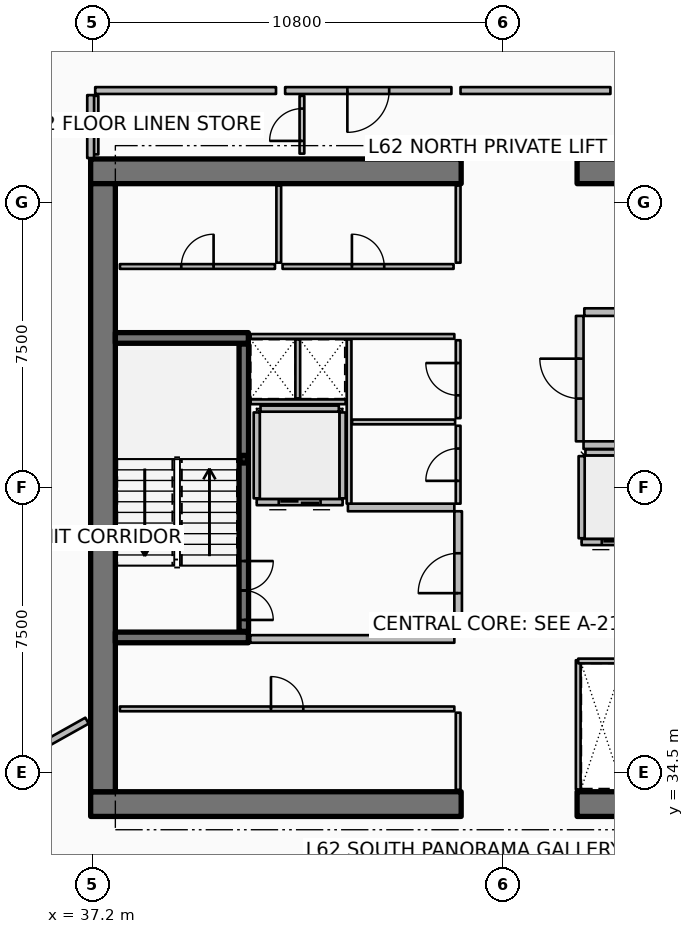
"""IFC4 building model, lengths in metres.
Left out: names, types, materials, properties, quantities, classifications, styles, units other than length and angle.
Written with IfcOpenShell. Run it as: python <this file> out.ifc"""

import sys

from ifc_helpers import new_model, si_unit, direction, frame, frame_2d, origin, origin_2d, place, context, subcontext, project, spatial, rectangle, hollow_rectangle, extrude, element, fill, save


model = new_model("IFC4")
c1 = context("Model", 3, precision=1e-05, world=origin(), true_north=direction((0.0, 1.0)))
c2 = subcontext(c1, "Body", "Model", "MODEL_VIEW")
j1 = project(units=[si_unit("LENGTHUNIT", "METRE"), si_unit("PLANEANGLEUNIT", "RADIAN")], contexts=[c1])
p1 = place(None, origin())
s1 = spatial("IfcSite", under=j1, at=p1, CompositionType="ELEMENT")
p2 = place(p1, origin())
s2 = spatial("IfcBuilding", under=s1, at=p2, CompositionType="ELEMENT")
p3 = place(p2, frame((0.0, 0.0, 248.25)))
s3 = spatial("IfcBuildingStorey", under=s2, at=p3, CompositionType="ELEMENT", Elevation=248.25)
for number, where, z_axis, x_axis in (
    (1, (37.15, 33.675, 0.0), (0.0, 0.0, 1.0), (1.0, 0.0, 0.0)),
    (2, (49.95, 33.675, 0.0), (0.0, 0.0, 1.0), (1.0, 0.0, 0.0)),
    (3, (37.15, 50.325, 0.0), (0.0, 0.0, 1.0), (1.0, 0.0, 0.0)),
    (4, (49.95, 50.325, 0.0), (0.0, 0.0, 1.0), (1.0, 0.0, 0.0)),
):
    element("IfcWall", number, at=place(p3, frame(where, z_axis=z_axis, x_axis=x_axis)), inside=s3, PredefinedType="SHEAR", context=c2, shape_type="SweptSolid", body=[
        extrude(rectangle(XDim=9.75, YDim=0.65, at=frame_2d((4.875, 0.0))), origin(), (0.0, 0.0, 1.0), 3.85),
    ])
p4 = place(p3, frame((37.475, 34.0, 0.0), z_axis=(0.0, 0.0, 1.0), x_axis=(0.0, 1.0, 0.0)))
e5 = element("IfcWall", 5, at=p4, inside=s3, PredefinedType="SHEAR", context=c2, shape_type="SweptSolid", body=[
    extrude(rectangle(XDim=16.0, YDim=0.65, at=frame_2d((8.0, 0.0))), origin(), (0.0, 0.0, 1.0), 3.85),
])
for number, where, z_axis, x_axis in (
    (6, (37.8, 38.06, 0.0), (0.0, 0.0, 1.0), (1.0, 0.0, 0.0)),
    (7, (37.8, 45.94, 0.0), (0.0, 0.0, 1.0), (1.0, 0.0, 0.0)),
):
    element("IfcWall", number, at=place(p3, frame(where, z_axis=z_axis, x_axis=x_axis)), inside=s3, PredefinedType="SHEAR", context=c2, shape_type="SweptSolid", body=[
        extrude(rectangle(XDim=3.5, YDim=0.28, at=frame_2d((1.75, 0.0))), origin(), (0.0, 0.0, 1.0), 3.85),
    ])
p5 = place(p3, frame((41.18, 42.75, 0.0), z_axis=(0.0, 0.0, 1.0), x_axis=(1.0, 0.0, 0.0)))
e8 = element("IfcColumn", 8, at=p5, inside=s3, PredefinedType="COLUMN", context=c2, shape_type="SweptSolid", body=[
    extrude(hollow_rectangle(XDim=0.2, YDim=0.2, WallThickness=0.01, InnerFilletRadius=0.01, OuterFilletRadius=0.02, at=origin_2d()), origin(), (0.0, 0.0, 1.0), 1.72),
])
p6 = place(p3, frame((41.18, 38.22, 0.0), z_axis=(0.0, 0.0, 1.0), x_axis=(0.0, 1.0, 0.0)))
e9 = element("IfcWall", 9, at=p6, inside=s3, PredefinedType="SOLIDWALL", context=c2, shape_type="SweptSolid", body=[
    extrude(rectangle(XDim=7.56, YDim=0.25, at=frame_2d((3.78, 0.0))), origin(), (0.0, 0.0, 1.0), 3.59),
])
p7 = place(p6, frame((0.3, 0.0, 0.0)))
e10 = element("IfcOpeningElement", 10, at=p7, cuts=e9, PredefinedType="OPENING", context=c2, shape_type="SweptSolid", body=[
    extrude(rectangle(XDim=1.55, YDim=2.15, at=frame_2d((0.775, 1.075))), frame((0.0, 0.135, 0.0), z_axis=(0.0, -1.0, 0.0), x_axis=(1.0, 0.0, 0.0)), (0.0, 0.0, 1.0), 0.27),
])
p8 = place(p3, frame((43.78, 41.62, 0.0), z_axis=(0.0, 0.0, 1.0), x_axis=(-1.0, 0.0, 0.0)))
e11 = element("IfcWall", 11, at=p8, inside=s3, PredefinedType="PARTITIONING", context=c2, shape_type="SweptSolid", body=[
    extrude(rectangle(XDim=2.26, YDim=0.16, at=frame_2d((1.13, 0.0))), origin(), (0.0, 0.0, 1.0), 3.59),
])
p9 = place(p8, frame((0.58, 0.0, 0.0)))
e12 = element("IfcOpeningElement", 12, at=p9, cuts=e11, PredefinedType="OPENING", context=c2, shape_type="SweptSolid", body=[
    extrude(rectangle(XDim=1.1, YDim=2.1, at=frame_2d((0.55, 1.05))), frame((0.0, 0.09, 0.0), z_axis=(0.0, -1.0, 0.0), x_axis=(1.0, 0.0, 0.0)), (0.0, 0.0, 1.0), 0.18),
])
for number, where, z_axis, x_axis in (
    (13, (43.78, 41.72, 0.0), (0.0, 0.0, 1.0), (0.0, 1.0, 0.0)),
    (14, (41.52, 41.72, 0.0), (0.0, 0.0, 1.0), (0.0, 1.0, 0.0)),
):
    element("IfcWall", number, at=place(p3, frame(where, z_axis=z_axis, x_axis=x_axis)), inside=s3, PredefinedType="PARTITIONING", context=c2, shape_type="SweptSolid", body=[
        extrude(rectangle(XDim=2.26, YDim=0.16, at=frame_2d((1.13, 0.0))), origin(), (0.0, 0.0, 1.0), 3.59),
    ])
p10 = place(p3, frame((41.62, 44.08, 0.0), z_axis=(0.0, 0.0, 1.0), x_axis=(1.0, 0.0, 0.0)))
e15 = element("IfcWall", 15, at=p10, inside=s3, PredefinedType="PARTITIONING", context=c2, shape_type="SweptSolid", body=[
    extrude(rectangle(XDim=2.06, YDim=0.16, at=frame_2d((1.03, 0.0))), origin(), (0.0, 0.0, 1.0), 3.59),
])
p11 = place(p3, frame((52.23, 40.57, 0.0), z_axis=(0.0, 0.0, 1.0), x_axis=(-1.0, 0.0, 0.0)))
e16 = element("IfcWall", 16, at=p11, inside=s3, PredefinedType="PARTITIONING", context=c2, shape_type="SweptSolid", body=[
    extrude(rectangle(XDim=2.16, YDim=0.16, at=frame_2d((1.08, 0.0))), origin(), (0.0, 0.0, 1.0), 3.59),
])
p12 = place(p11, frame((0.53, 0.0, 0.0)))
e17 = element("IfcOpeningElement", 17, at=p12, cuts=e16, PredefinedType="OPENING", context=c2, shape_type="SweptSolid", body=[
    extrude(rectangle(XDim=1.1, YDim=2.1, at=frame_2d((0.55, 1.05))), frame((0.0, 0.09, 0.0), z_axis=(0.0, -1.0, 0.0), x_axis=(1.0, 0.0, 0.0)), (0.0, 0.0, 1.0), 0.18),
])
p13 = place(p3, frame((50.07, 40.67, 0.0), z_axis=(0.0, 0.0, 1.0), x_axis=(0.0, 1.0, 0.0)))
e18 = element("IfcWall", 18, at=p13, inside=s3, PredefinedType="PARTITIONING", context=c2, shape_type="SweptSolid", body=[
    extrude(rectangle(XDim=2.16, YDim=0.16, at=frame_2d((1.08, 0.0))), origin(), (0.0, 0.0, 1.0), 3.59),
])
p14 = place(p3, frame((50.17, 42.93, 0.0), z_axis=(0.0, 0.0, 1.0), x_axis=(1.0, 0.0, 0.0)))
e19 = element("IfcWall", 19, at=p14, inside=s3, PredefinedType="PARTITIONING", context=c2, shape_type="SweptSolid", body=[
    extrude(rectangle(XDim=1.96, YDim=0.16, at=frame_2d((0.98, 0.0))), origin(), (0.0, 0.0, 1.0), 3.59),
])
p15 = place(p3, frame((46.82, 34.05, 0.0), z_axis=(0.0, 0.0, 1.0), x_axis=(0.0, 1.0, 0.0)))
e20 = element("IfcWall", 20, at=p15, inside=s3, PredefinedType="PARTITIONING", context=c2, shape_type="SweptSolid", body=[
    extrude(rectangle(XDim=2.03, YDim=0.125, at=frame_2d((1.015, 0.0))), origin(), (0.0, 0.0, 1.0), 3.03),
])
p16 = place(p3, frame((37.92, 36.18, 0.0), z_axis=(0.0, 0.0, 1.0), x_axis=(1.0, 0.0, 0.0)))
e21 = element("IfcWall", 21, at=p16, inside=s3, PredefinedType="PARTITIONING", context=c2, shape_type="SweptSolid", body=[
    extrude(rectangle(XDim=8.8, YDim=0.125, at=frame_2d((4.4, 0.0))), origin(), (0.0, 0.0, 1.0), 3.03),
])
p17 = place(p16, frame((3.975, 0.0, 0.0)))
e22 = element("IfcOpeningElement", 22, at=p17, cuts=e21, PredefinedType="OPENING", context=c2, shape_type="SweptSolid", body=[
    extrude(rectangle(XDim=0.85, YDim=2.06, at=frame_2d((0.425, 1.03))), frame((0.0, 0.073, 0.0), z_axis=(0.0, -1.0, 0.0), x_axis=(1.0, 0.0, 0.0)), (0.0, 0.0, 1.0), 0.145),
])
for number, where, z_axis, x_axis in (
    (23, (46.82, 47.92, 0.0), (0.0, 0.0, 1.0), (0.0, 1.0, 0.0)),
    (24, (42.1, 47.92, 0.0), (0.0, 0.0, 1.0), (0.0, 1.0, 0.0)),
):
    element("IfcWall", number, at=place(p3, frame(where, z_axis=z_axis, x_axis=x_axis)), inside=s3, PredefinedType="PARTITIONING", context=c2, shape_type="SweptSolid", body=[
        extrude(rectangle(XDim=2.03, YDim=0.125, at=frame_2d((1.015, 0.0))), origin(), (0.0, 0.0, 1.0), 3.03),
    ])
p18 = place(p3, frame((37.92, 47.82, 0.0), z_axis=(0.0, 0.0, 1.0), x_axis=(1.0, 0.0, 0.0)))
e25 = element("IfcWall", 25, at=p18, inside=s3, PredefinedType="PARTITIONING", context=c2, shape_type="SweptSolid", body=[
    extrude(rectangle(XDim=4.08, YDim=0.125, at=frame_2d((2.04, 0.0))), origin(), (0.0, 0.0, 1.0), 3.03),
])
p19 = place(p18, frame((1.615, 0.0, 0.0)))
e26 = element("IfcOpeningElement", 26, at=p19, cuts=e25, PredefinedType="OPENING", context=c2, shape_type="SweptSolid", body=[
    extrude(rectangle(XDim=0.85, YDim=2.06, at=frame_2d((0.425, 1.03))), frame((0.0, 0.073, 0.0), z_axis=(0.0, -1.0, 0.0), x_axis=(1.0, 0.0, 0.0)), (0.0, 0.0, 1.0), 0.145),
])
p20 = place(p3, frame((42.2, 47.82, 0.0), z_axis=(0.0, 0.0, 1.0), x_axis=(1.0, 0.0, 0.0)))
e27 = element("IfcWall", 27, at=p20, inside=s3, PredefinedType="PARTITIONING", context=c2, shape_type="SweptSolid", body=[
    extrude(rectangle(XDim=4.5, YDim=0.125, at=frame_2d((2.25, 0.0))), origin(), (0.0, 0.0, 1.0), 3.03),
])
p21 = place(p20, frame((1.825, 0.0, 0.0)))
e28 = element("IfcOpeningElement", 28, at=p21, cuts=e27, PredefinedType="OPENING", context=c2, shape_type="SweptSolid", body=[
    extrude(rectangle(XDim=0.85, YDim=2.06, at=frame_2d((0.425, 1.03))), frame((0.0, 0.073, 0.0), z_axis=(0.0, -1.0, 0.0), x_axis=(1.0, 0.0, 0.0)), (0.0, 0.0, 1.0), 0.145),
])
p22 = place(p3, frame((41.35, 38.02, 0.0), z_axis=(0.0, 0.0, 1.0), x_axis=(1.0, 0.0, 0.0)))
e29 = element("IfcWall", 29, at=p22, inside=s3, PredefinedType="PARTITIONING", context=c2, shape_type="SweptSolid", body=[
    extrude(rectangle(XDim=5.37, YDim=0.2, at=frame_2d((2.685, 0.0))), origin(), (0.0, 0.0, 1.0), 3.59),
])
p23 = place(p3, frame((43.92, 41.48, 0.0), z_axis=(0.0, 0.0, 1.0), x_axis=(1.0, 0.0, 0.0)))
e30 = element("IfcWall", 30, at=p23, inside=s3, PredefinedType="PARTITIONING", context=c2, shape_type="SweptSolid", body=[
    extrude(rectangle(XDim=2.8, YDim=0.2, at=frame_2d((1.4, 0.0))), origin(), (0.0, 0.0, 1.0), 3.59),
])
p24 = place(p3, frame((46.82, 38.12, 0.0), z_axis=(0.0, 0.0, 1.0), x_axis=(0.0, 1.0, 0.0)))
e31 = element("IfcWall", 31, at=p24, inside=s3, PredefinedType="PARTITIONING", context=c2, shape_type="SweptSolid", body=[
    extrude(rectangle(XDim=3.26, YDim=0.2, at=frame_2d((1.63, 0.0))), origin(), (0.0, 0.0, 1.0), 3.59),
])
p25 = place(p24, frame((1.105, 0.0, 0.0)))
e32 = element("IfcOpeningElement", 32, at=p25, cuts=e31, PredefinedType="OPENING", context=c2, shape_type="SweptSolid", body=[
    extrude(rectangle(XDim=1.05, YDim=2.1, at=frame_2d((0.525, 1.05))), frame((0.0, 0.11, 0.0), z_axis=(0.0, -1.0, 0.0), x_axis=(1.0, 0.0, 0.0)), (0.0, 0.0, 1.0), 0.22),
])
p26 = place(p3, frame((50.12, 43.12, 0.0), z_axis=(0.0, 0.0, 1.0), x_axis=(1.0, 0.0, 0.0)))
e33 = element("IfcWall", 33, at=p26, inside=s3, PredefinedType="PARTITIONING", context=c2, shape_type="SweptSolid", body=[
    extrude(rectangle(XDim=8.88, YDim=0.2, at=frame_2d((4.44, 0.0))), origin(), (0.0, 0.0, 1.0), 3.59),
])
p27 = place(p3, frame((50.14, 46.62, 0.0), z_axis=(0.0, 0.0, 1.0), x_axis=(1.0, 0.0, 0.0)))
e34 = element("IfcWall", 34, at=p27, inside=s3, PredefinedType="PARTITIONING", context=c2, shape_type="SweptSolid", body=[
    extrude(rectangle(XDim=1.02, YDim=0.2, at=frame_2d((0.51, 0.0))), origin(), (0.0, 0.0, 1.0), 3.59),
])
p28 = place(p3, frame((50.02, 43.22, 0.0), z_axis=(0.0, 0.0, 1.0), x_axis=(0.0, 1.0, 0.0)))
e35 = element("IfcWall", 35, at=p28, inside=s3, PredefinedType="PARTITIONING", context=c2, shape_type="SweptSolid", body=[
    extrude(rectangle(XDim=3.3, YDim=0.2, at=frame_2d((1.65, 0.0))), origin(), (0.0, 0.0, 1.0), 3.59),
])
p29 = place(p28, frame((1.125, 0.0, 0.0)))
e36 = element("IfcOpeningElement", 36, at=p29, cuts=e35, PredefinedType="OPENING", context=c2, shape_type="SweptSolid", body=[
    extrude(rectangle(XDim=1.05, YDim=2.1, at=frame_2d((0.525, 1.05))), frame((0.0, 0.11, 0.0), z_axis=(0.0, -1.0, 0.0), x_axis=(1.0, 0.0, 0.0)), (0.0, 0.0, 1.0), 0.22),
])
p30 = place(p3, frame((41.36, 45.98, 0.0), z_axis=(0.0, 0.0, 1.0), x_axis=(1.0, 0.0, 0.0)))
e37 = element("IfcWall", 37, at=p30, inside=s3, PredefinedType="PARTITIONING", context=c2, shape_type="SweptSolid", body=[
    extrude(rectangle(XDim=5.36, YDim=0.125, at=frame_2d((2.68, 0.0))), origin(), (0.0, 0.0, 1.0), 3.03),
])
p31 = place(p3, frame((41.36, 44.26, 0.0), z_axis=(0.0, 0.0, 1.0), x_axis=(1.0, 0.0, 0.0)))
e38 = element("IfcWall", 38, at=p31, inside=s3, PredefinedType="PARTITIONING", context=c2, shape_type="SweptSolid", body=[
    extrude(rectangle(XDim=2.5, YDim=0.125, at=frame_2d((1.25, 0.0))), origin(), (0.0, 0.0, 1.0), 3.03),
])
p32 = place(p3, frame((42.6, 44.35, 0.0), z_axis=(0.0, 0.0, 1.0), x_axis=(0.0, 1.0, 0.0)))
e39 = element("IfcWall", 39, at=p32, inside=s3, PredefinedType="PARTITIONING", context=c2, shape_type="SweptSolid", body=[
    extrude(rectangle(XDim=1.55, YDim=0.125, at=frame_2d((0.775, 0.0))), origin(), (0.0, 0.0, 1.0), 3.03),
])
p33 = place(p3, frame((49.98, 34.06, 0.0), z_axis=(0.0, 0.0, 1.0), x_axis=(0.0, 1.0, 0.0)))
e40 = element("IfcWall", 40, at=p33, inside=s3, PredefinedType="PARTITIONING", context=c2, shape_type="SweptSolid", body=[
    extrude(rectangle(XDim=3.4, YDim=0.125, at=frame_2d((1.7, 0.0))), origin(), (0.0, 0.0, 1.0), 3.03),
])
p34 = place(p3, frame((49.98, 37.44, 0.0), z_axis=(0.0, 0.0, 1.0), x_axis=(1.0, 0.0, 0.0)))
e41 = element("IfcWall", 41, at=p34, inside=s3, PredefinedType="PARTITIONING", context=c2, shape_type="SweptSolid", body=[
    extrude(rectangle(XDim=1.26, YDim=0.125, at=frame_2d((0.63, 0.0))), origin(), (0.0, 0.0, 1.0), 3.03),
])
p35 = place(p3, frame((43.95, 41.58, 0.0), z_axis=(0.0, 0.0, 1.0), x_axis=(0.0, 1.0, 0.0)))
e42 = element("IfcWall", 42, at=p35, inside=s3, PredefinedType="PARTITIONING", context=c2, shape_type="SweptSolid", body=[
    extrude(rectangle(XDim=4.32, YDim=0.125, at=frame_2d((2.16, 0.0))), origin(), (0.0, 0.0, 1.0), 3.03),
])
p36 = place(p3, frame((44.03, 43.73, 0.0), z_axis=(0.0, 0.0, 1.0), x_axis=(1.0, 0.0, 0.0)))
e43 = element("IfcWall", 43, at=p36, inside=s3, PredefinedType="PARTITIONING", context=c2, shape_type="SweptSolid", body=[
    extrude(rectangle(XDim=2.71, YDim=0.125, at=frame_2d((1.355, 0.0))), origin(), (0.0, 0.0, 1.0), 3.03),
])
p37 = place(p3, frame((46.82, 41.58, 0.0), z_axis=(0.0, 0.0, 1.0), x_axis=(0.0, 1.0, 0.0)))
e44 = element("IfcWall", 44, at=p37, inside=s3, PredefinedType="PARTITIONING", context=c2, shape_type="SweptSolid", body=[
    extrude(rectangle(XDim=2.05, YDim=0.125, at=frame_2d((1.025, 0.0))), origin(), (0.0, 0.0, 1.0), 3.03),
])
p38 = place(p37, frame((0.6, 0.0, 0.0)))
e45 = element("IfcOpeningElement", 45, at=p38, cuts=e44, PredefinedType="OPENING", context=c2, shape_type="SweptSolid", body=[
    extrude(rectangle(XDim=0.85, YDim=2.06, at=frame_2d((0.425, 1.03))), frame((0.0, 0.073, 0.0), z_axis=(0.0, -1.0, 0.0), x_axis=(1.0, 0.0, 0.0)), (0.0, 0.0, 1.0), 0.145),
])
p39 = place(p3, frame((46.82, 43.83, 0.0), z_axis=(0.0, 0.0, 1.0), x_axis=(0.0, 1.0, 0.0)))
e46 = element("IfcWall", 46, at=p39, inside=s3, PredefinedType="PARTITIONING", context=c2, shape_type="SweptSolid", body=[
    extrude(rectangle(XDim=2.05, YDim=0.125, at=frame_2d((1.025, 0.0))), origin(), (0.0, 0.0, 1.0), 3.03),
])
p40 = place(p39, frame((0.6, 0.0, 0.0)))
e47 = element("IfcOpeningElement", 47, at=p40, cuts=e46, PredefinedType="OPENING", context=c2, shape_type="SweptSolid", body=[
    extrude(rectangle(XDim=0.85, YDim=2.06, at=frame_2d((0.425, 1.03))), frame((0.0, 0.073, 0.0), z_axis=(0.0, -1.0, 0.0), x_axis=(1.0, 0.0, 0.0)), (0.0, 0.0, 1.0), 0.145),
])
p41 = place(p3, frame((37.29, 50.77, 0.0), z_axis=(0.0, 0.0, 1.0), x_axis=(0.0, 1.0, 0.0)))
e48 = element("IfcWall", 48, at=p41, inside=s3, PredefinedType="PARTITIONING", context=c2, shape_type="SweptSolid", body=[
    extrude(rectangle(XDim=1.54, YDim=0.125, at=frame_2d((0.77, 0.0))), origin(), (0.0, 0.0, 1.0), 3.03),
])
p42 = place(p3, frame((42.71, 50.79, 0.0), z_axis=(0.0, 0.0, 1.0), x_axis=(0.0, 1.0, 0.0)))
e49 = element("IfcWall", 49, at=p42, inside=s3, PredefinedType="PARTITIONING", context=c2, shape_type="SweptSolid", body=[
    extrude(rectangle(XDim=1.52, YDim=0.125, at=frame_2d((0.76, 0.0))), origin(), (0.0, 0.0, 1.0), 2.957),
])
p43 = place(p42, frame((0.335, 0.0, 0.0)))
e50 = element("IfcOpeningElement", 50, at=p43, cuts=e49, PredefinedType="OPENING", context=c2, shape_type="SweptSolid", body=[
    extrude(rectangle(XDim=0.85, YDim=2.06, at=frame_2d((0.425, 1.03))), frame((0.0, 0.073, 0.0), z_axis=(0.0, -1.0, 0.0), x_axis=(1.0, 0.0, 0.0)), (0.0, 0.0, 1.0), 0.145),
])
p44 = place(p3, frame((37.054, 35.87, 0.0), z_axis=(0.0, 0.0, 1.0), x_axis=(-0.872490186067, -0.488631635506, 0.0)))
e51 = element("IfcWall", 51, at=p44, inside=s3, PredefinedType="PARTITIONING", context=c2, shape_type="SweptSolid", body=[
    extrude(rectangle(XDim=17.884, YDim=0.18, at=frame_2d((8.942, 0.0))), origin(), (0.0, 0.0, 1.0), 2.957),
])
p45 = place(p3, frame((46.643, 52.45, 0.0), z_axis=(0.0, 0.0, 1.0), x_axis=(-1.0, 0.0, 0.0)))
e52 = element("IfcWall", 52, at=p45, inside=s3, PredefinedType="PARTITIONING", context=c2, shape_type="SweptSolid", body=[
    extrude(rectangle(XDim=4.376, YDim=0.18, at=frame_2d((2.188, 0.0))), origin(), (0.0, 0.0, 1.0), 2.957),
])
p46 = place(p45, frame((1.638, 0.0, 0.0)))
e53 = element("IfcOpeningElement", 53, at=p46, cuts=e52, PredefinedType="OPENING", context=c2, shape_type="SweptSolid", body=[
    extrude(rectangle(XDim=1.1, YDim=2.1, at=frame_2d((0.55, 1.05))), frame((0.0, 0.1, 0.0), z_axis=(0.0, -1.0, 0.0), x_axis=(1.0, 0.0, 0.0)), (0.0, 0.0, 1.0), 0.2),
])
p47 = place(p3, frame((50.827, 52.45, 0.0), z_axis=(0.0, 0.0, 1.0), x_axis=(-1.0, 0.0, 0.0)))
e54 = element("IfcWall", 54, at=p47, inside=s3, PredefinedType="PARTITIONING", context=c2, shape_type="SweptSolid", body=[
    extrude(rectangle(XDim=3.944, YDim=0.18, at=frame_2d((1.972, 0.0))), origin(), (0.0, 0.0, 1.0), 2.957),
])
p48 = place(p3, frame((42.028, 52.45, 0.0), z_axis=(0.0, 0.0, 1.0), x_axis=(-1.0, 0.0, 0.0)))
e55 = element("IfcWall", 55, at=p48, inside=s3, PredefinedType="PARTITIONING", context=c2, shape_type="SweptSolid", body=[
    extrude(rectangle(XDim=4.758, YDim=0.18, at=frame_2d((2.379, 0.0))), origin(), (0.0, 0.0, 1.0), 2.957),
])
p49 = place(p3, frame((37.15, 52.33, 0.0), z_axis=(0.0, 0.0, 1.0), x_axis=(0.0, -1.0, 0.0)))
e56 = element("IfcWall", 56, at=p49, inside=s3, PredefinedType="PARTITIONING", context=c2, shape_type="SweptSolid", body=[
    extrude(rectangle(XDim=1.656, YDim=0.18, at=frame_2d((0.828, 0.0))), origin(), (0.0, 0.0, 1.0), 2.957),
])
p50 = place(p7, origin())
e57 = element("IfcDoor", 57, at=p50, inside=s3, OperationType="DOUBLE_DOOR_SINGLE_SWING", PredefinedType="DOOR", context=c2, shape_type="SweptSolid", body=[
    extrude(rectangle(XDim=1.55, YDim=2.15, at=frame_2d((0.775, 1.075))), frame((0.0, 0.025, 0.0), z_axis=(0.0, -1.0, 0.0), x_axis=(1.0, 0.0, 0.0)), (0.0, 0.0, 1.0), 0.05),
])
fill(e10, e57)
p51 = place(p9, origin())
e58 = element("IfcDoor", 58, at=p51, inside=s3, OperationType="DOUBLE_DOOR_SLIDING", PredefinedType="DOOR", context=c2, shape_type="SweptSolid", body=[
    extrude(rectangle(XDim=1.1, YDim=2.1, at=frame_2d((0.55, 1.05))), frame((0.0, 0.025, 0.0), z_axis=(0.0, -1.0, 0.0), x_axis=(1.0, 0.0, 0.0)), (0.0, 0.0, 1.0), 0.05),
])
fill(e12, e58)
p52 = place(p12, origin())
e59 = element("IfcDoor", 59, at=p52, inside=s3, OperationType="DOUBLE_DOOR_SLIDING", PredefinedType="DOOR", context=c2, shape_type="SweptSolid", body=[
    extrude(rectangle(XDim=1.1, YDim=2.1, at=frame_2d((0.55, 1.05))), frame((0.0, 0.025, 0.0), z_axis=(0.0, -1.0, 0.0), x_axis=(1.0, 0.0, 0.0)), (0.0, 0.0, 1.0), 0.05),
])
fill(e17, e59)
p53 = place(p17, origin())
e60 = element("IfcDoor", 60, at=p53, inside=s3, OperationType="SINGLE_SWING_LEFT", PredefinedType="DOOR", context=c2, shape_type="SweptSolid", body=[
    extrude(rectangle(XDim=0.85, YDim=2.06, at=frame_2d((0.425, 1.03))), frame((0.0, 0.025, 0.0), z_axis=(0.0, -1.0, 0.0), x_axis=(1.0, 0.0, 0.0)), (0.0, 0.0, 1.0), 0.05),
])
fill(e22, e60)
p54 = place(p19, origin())
e61 = element("IfcDoor", 61, at=p54, inside=s3, OperationType="SINGLE_SWING_RIGHT", PredefinedType="DOOR", context=c2, shape_type="SweptSolid", body=[
    extrude(rectangle(XDim=0.85, YDim=2.06, at=frame_2d((0.425, 1.03))), frame((0.0, 0.025, 0.0), z_axis=(0.0, -1.0, 0.0), x_axis=(1.0, 0.0, 0.0)), (0.0, 0.0, 1.0), 0.05),
])
fill(e26, e61)
p55 = place(p21, origin())
e62 = element("IfcDoor", 62, at=p55, inside=s3, OperationType="SINGLE_SWING_LEFT", PredefinedType="DOOR", context=c2, shape_type="SweptSolid", body=[
    extrude(rectangle(XDim=0.85, YDim=2.06, at=frame_2d((0.425, 1.03))), frame((0.0, 0.025, 0.0), z_axis=(0.0, -1.0, 0.0), x_axis=(1.0, 0.0, 0.0)), (0.0, 0.0, 1.0), 0.05),
])
fill(e28, e62)
p56 = place(p25, origin())
e63 = element("IfcDoor", 63, at=p56, inside=s3, OperationType="SINGLE_SWING_LEFT", PredefinedType="DOOR", context=c2, shape_type="SweptSolid", body=[
    extrude(rectangle(XDim=1.05, YDim=2.1, at=frame_2d((0.525, 1.05))), frame((0.0, 0.025, 0.0), z_axis=(0.0, -1.0, 0.0), x_axis=(1.0, 0.0, 0.0)), (0.0, 0.0, 1.0), 0.05),
])
fill(e32, e63)
p57 = place(p29, origin())
e64 = element("IfcDoor", 64, at=p57, inside=s3, OperationType="SINGLE_SWING_RIGHT", PredefinedType="DOOR", context=c2, shape_type="SweptSolid", body=[
    extrude(rectangle(XDim=1.05, YDim=2.1, at=frame_2d((0.525, 1.05))), frame((0.0, 0.025, 0.0), z_axis=(0.0, -1.0, 0.0), x_axis=(1.0, 0.0, 0.0)), (0.0, 0.0, 1.0), 0.05),
])
fill(e36, e64)
p58 = place(p38, origin())
e65 = element("IfcDoor", 65, at=p58, inside=s3, OperationType="SINGLE_SWING_LEFT", PredefinedType="DOOR", context=c2, shape_type="SweptSolid", body=[
    extrude(rectangle(XDim=0.85, YDim=2.06, at=frame_2d((0.425, 1.03))), frame((0.0, 0.025, 0.0), z_axis=(0.0, -1.0, 0.0), x_axis=(1.0, 0.0, 0.0)), (0.0, 0.0, 1.0), 0.05),
])
fill(e45, e65)
p59 = place(p40, origin())
e66 = element("IfcDoor", 66, at=p59, inside=s3, OperationType="SINGLE_SWING_RIGHT", PredefinedType="DOOR", context=c2, shape_type="SweptSolid", body=[
    extrude(rectangle(XDim=0.85, YDim=2.06, at=frame_2d((0.425, 1.03))), frame((0.0, 0.025, 0.0), z_axis=(0.0, -1.0, 0.0), x_axis=(1.0, 0.0, 0.0)), (0.0, 0.0, 1.0), 0.05),
])
fill(e47, e66)
p60 = place(p43, origin())
e67 = element("IfcDoor", 67, at=p60, inside=s3, OperationType="SINGLE_SWING_LEFT", PredefinedType="DOOR", context=c2, shape_type="SweptSolid", body=[
    extrude(rectangle(XDim=0.85, YDim=2.06, at=frame_2d((0.425, 1.03))), frame((0.0, 0.025, 0.0), z_axis=(0.0, -1.0, 0.0), x_axis=(1.0, 0.0, 0.0)), (0.0, 0.0, 1.0), 0.05),
])
fill(e50, e67)
p61 = place(p46, origin())
e68 = element("IfcDoor", 68, at=p61, inside=s3, OperationType="SINGLE_SWING_RIGHT", PredefinedType="DOOR", context=c2, shape_type="SweptSolid", body=[
    extrude(rectangle(XDim=1.1, YDim=2.1, at=frame_2d((0.55, 1.05))), frame((0.0, 0.025, 0.0), z_axis=(0.0, -1.0, 0.0), x_axis=(1.0, 0.0, 0.0)), (0.0, 0.0, 1.0), 0.05),
])
fill(e53, e68)
save(model, sys.argv[1])
